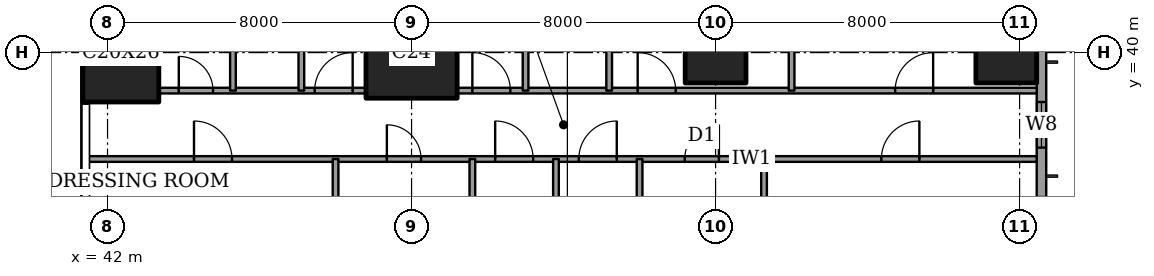
"""IFC4 building model, lengths in metres.
Left out: names, types, materials, properties, quantities, classifications, styles, units other than length and angle.
Written with IfcOpenShell. Run it as: python <this file> out.ifc"""

import sys

from ifc_helpers import new_model, si_unit, direction, frame, frame_2d, origin, origin_2d, place, context, subcontext, project, spatial, rectangle, extrude, element, fill, save


model = new_model("IFC4")
c1 = context("Model", 3, precision=1e-05, world=origin(), true_north=direction((0.0, 1.0)))
c2 = subcontext(c1, "Body", "Model", "MODEL_VIEW")
j1 = project(units=[si_unit("LENGTHUNIT", "METRE"), si_unit("PLANEANGLEUNIT", "RADIAN")], contexts=[c1])
p1 = place(None, origin())
s1 = spatial("IfcSite", under=j1, at=p1, CompositionType="ELEMENT")
p2 = place(p1, origin())
s2 = spatial("IfcBuilding", under=s1, at=p2, CompositionType="ELEMENT")
p3 = place(p2, frame((0.0, 0.0, 248.4)))
s3 = spatial("IfcBuildingStorey", under=s2, at=p3, CompositionType="ELEMENT", Elevation=248.4)
p4 = place(p3, frame((42.35, 40.0, 0.0), z_axis=(0.0, 0.0, 1.0), x_axis=(1.0, 0.0, 0.0)))
e1 = element("IfcColumn", 1, at=p4, inside=s3, PredefinedType="COLUMN", context=c2, shape_type="SweptSolid", body=[
    extrude(rectangle(XDim=2.0, YDim=2.6, at=origin_2d()), origin(), (0.0, 0.0, 1.0), 3.6),
])
p5 = place(p3, frame((50.0, 40.0, 0.0), z_axis=(0.0, 0.0, 1.0), x_axis=(1.0, 0.0, 0.0)))
e2 = element("IfcColumn", 2, at=p5, inside=s3, PredefinedType="COLUMN", context=c2, shape_type="SweptSolid", body=[
    extrude(rectangle(XDim=2.4, YDim=2.4, at=origin_2d()), origin(), (0.0, 0.0, 1.0), 3.6),
])
for number, where, z_axis, x_axis in (
    (3, (58.0, 40.0, 0.0), (0.0, 0.0, 1.0), (1.0, 0.0, 0.0)),
    (4, (65.65, 40.0, 0.0), (0.0, 0.0, 1.0), (1.0, 0.0, 0.0)),
):
    element("IfcColumn", number, at=place(p3, frame(where, z_axis=z_axis, x_axis=x_axis)), inside=s3, PredefinedType="COLUMN", context=c2, shape_type="SweptSolid", body=[
        extrude(rectangle(XDim=1.6, YDim=1.6, at=origin_2d()), origin(), (0.0, 0.0, 1.0), 3.6),
    ])
p6 = place(p3, frame((66.575, 3.175, 0.0), z_axis=(0.0, 0.0, 1.0), x_axis=(0.0, 1.0, 0.0)))
e5 = element("IfcWall", 5, at=p6, inside=s3, PredefinedType="SOLIDWALL", context=c2, shape_type="SweptSolid", body=[
    extrude(rectangle(XDim=41.65, YDim=0.25, at=frame_2d((20.825, 0.0))), origin(), (0.0, 0.0, 1.0), 3.6),
])
p7 = place(p6, frame((0.875, 0.0, 0.6)))
e6 = element("IfcOpeningElement", 6, at=p7, cuts=e5, PredefinedType="OPENING", context=c2, shape_type="SweptSolid", body=[
    extrude(rectangle(XDim=2.4, YDim=2.0, at=frame_2d((1.2, 1.0))), frame((0.0, 0.135, 0.0), z_axis=(0.0, -1.0, 0.0), x_axis=(1.0, 0.0, 0.0)), (0.0, 0.0, 1.0), 0.27),
])
p8 = place(p6, frame((6.0, 0.0, 0.6)))
e7 = element("IfcOpeningElement", 7, at=p8, cuts=e5, PredefinedType="OPENING", context=c2, shape_type="SweptSolid", body=[
    extrude(rectangle(XDim=1.2, YDim=2.0, at=frame_2d((0.6, 1.0))), frame((0.0, 0.135, 0.0), z_axis=(0.0, -1.0, 0.0), x_axis=(1.0, 0.0, 0.0)), (0.0, 0.0, 1.0), 0.27),
])
p9 = place(p6, frame((8.525, 0.0, 0.6)))
e8 = element("IfcOpeningElement", 8, at=p9, cuts=e5, PredefinedType="OPENING", context=c2, shape_type="SweptSolid", body=[
    extrude(rectangle(XDim=2.4, YDim=2.0, at=frame_2d((1.2, 1.0))), frame((0.0, 0.135, 0.0), z_axis=(0.0, -1.0, 0.0), x_axis=(1.0, 0.0, 0.0)), (0.0, 0.0, 1.0), 0.27),
])
p10 = place(p6, frame((15.725, 0.0, 0.6)))
e9 = element("IfcOpeningElement", 9, at=p10, cuts=e5, PredefinedType="OPENING", context=c2, shape_type="SweptSolid", body=[
    extrude(rectangle(XDim=2.4, YDim=2.0, at=frame_2d((1.2, 1.0))), frame((0.0, 0.135, 0.0), z_axis=(0.0, -1.0, 0.0), x_axis=(1.0, 0.0, 0.0)), (0.0, 0.0, 1.0), 0.27),
])
p11 = place(p6, frame((23.525, 0.0, 0.6)))
e10 = element("IfcOpeningElement", 10, at=p11, cuts=e5, PredefinedType="OPENING", context=c2, shape_type="SweptSolid", body=[
    extrude(rectangle(XDim=2.4, YDim=2.0, at=frame_2d((1.2, 1.0))), frame((0.0, 0.135, 0.0), z_axis=(0.0, -1.0, 0.0), x_axis=(1.0, 0.0, 0.0)), (0.0, 0.0, 1.0), 0.27),
])
p12 = place(p6, frame((30.625, 0.0, 0.6)))
e11 = element("IfcOpeningElement", 11, at=p12, cuts=e5, PredefinedType="OPENING", context=c2, shape_type="SweptSolid", body=[
    extrude(rectangle(XDim=2.4, YDim=2.0, at=frame_2d((1.2, 1.0))), frame((0.0, 0.135, 0.0), z_axis=(0.0, -1.0, 0.0), x_axis=(1.0, 0.0, 0.0)), (0.0, 0.0, 1.0), 0.27),
])
p13 = place(p6, frame((34.325, 0.0, 0.6)))
e12 = element("IfcOpeningElement", 12, at=p13, cuts=e5, PredefinedType="OPENING", context=c2, shape_type="SweptSolid", body=[
    extrude(rectangle(XDim=1.2, YDim=2.0, at=frame_2d((0.6, 1.0))), frame((0.0, 0.135, 0.0), z_axis=(0.0, -1.0, 0.0), x_axis=(1.0, 0.0, 0.0)), (0.0, 0.0, 1.0), 0.27),
])
p14 = place(p6, frame((38.375, 0.0, 0.6)))
e13 = element("IfcOpeningElement", 13, at=p14, cuts=e5, PredefinedType="OPENING", context=c2, shape_type="SweptSolid", body=[
    extrude(rectangle(XDim=2.4, YDim=2.0, at=frame_2d((1.2, 1.0))), frame((0.0, 0.135, 0.0), z_axis=(0.0, -1.0, 0.0), x_axis=(1.0, 0.0, 0.0)), (0.0, 0.0, 1.0), 0.27),
])
p15 = place(p3, frame((41.439, 37.2, 0.0), z_axis=(0.0, 0.0, 1.0), x_axis=(1.0, 0.0, 0.0)))
e14 = element("IfcWall", 14, at=p15, inside=s3, PredefinedType="PARTITIONING", context=c2, shape_type="SweptSolid", body=[
    extrude(rectangle(XDim=25.011, YDim=0.15, at=frame_2d((12.505, 0.0))), origin(), (0.0, 0.0, 1.0), 3.35),
])
p16 = place(p15, frame((10.761, 0.0, 0.0)))
e15 = element("IfcOpeningElement", 15, at=p16, cuts=e14, PredefinedType="OPENING", context=c2, shape_type="SweptSolid", body=[
    extrude(rectangle(XDim=1.0, YDim=2.1, at=frame_2d((0.5, 1.05))), frame((0.0, 0.085, 0.0), z_axis=(0.0, -1.0, 0.0), x_axis=(1.0, 0.0, 0.0)), (0.0, 0.0, 1.0), 0.17),
])
p17 = place(p15, frame((20.924, 0.0, 0.0)))
e16 = element("IfcOpeningElement", 16, at=p17, cuts=e14, PredefinedType="OPENING", context=c2, shape_type="SweptSolid", body=[
    extrude(rectangle(XDim=1.0, YDim=2.1, at=frame_2d((0.5, 1.05))), frame((0.0, 0.085, 0.0), z_axis=(0.0, -1.0, 0.0), x_axis=(1.0, 0.0, 0.0)), (0.0, 0.0, 1.0), 0.17),
])
p18 = place(p15, frame((15.749, 0.0, 0.0)))
e17 = element("IfcOpeningElement", 17, at=p18, cuts=e14, PredefinedType="OPENING", context=c2, shape_type="SweptSolid", body=[
    extrude(rectangle(XDim=0.9, YDim=2.1, at=frame_2d((0.45, 1.05))), frame((0.0, 0.085, 0.0), z_axis=(0.0, -1.0, 0.0), x_axis=(1.0, 0.0, 0.0)), (0.0, 0.0, 1.0), 0.17),
])
p19 = place(p15, frame((12.961, 0.0, 0.0)))
e18 = element("IfcOpeningElement", 18, at=p19, cuts=e14, PredefinedType="OPENING", context=c2, shape_type="SweptSolid", body=[
    extrude(rectangle(XDim=1.0, YDim=2.1, at=frame_2d((0.5, 1.05))), frame((0.0, 0.085, 0.0), z_axis=(0.0, -1.0, 0.0), x_axis=(1.0, 0.0, 0.0)), (0.0, 0.0, 1.0), 0.17),
])
p20 = place(p15, frame((7.911, 0.0, 0.0)))
e19 = element("IfcOpeningElement", 19, at=p20, cuts=e14, PredefinedType="OPENING", context=c2, shape_type="SweptSolid", body=[
    extrude(rectangle(XDim=0.9, YDim=2.1, at=frame_2d((0.45, 1.05))), frame((0.0, 0.085, 0.0), z_axis=(0.0, -1.0, 0.0), x_axis=(1.0, 0.0, 0.0)), (0.0, 0.0, 1.0), 0.17),
])
p21 = place(p15, frame((2.836, 0.0, 0.0)))
e20 = element("IfcOpeningElement", 20, at=p21, cuts=e14, PredefinedType="OPENING", context=c2, shape_type="SweptSolid", body=[
    extrude(rectangle(XDim=1.0, YDim=2.1, at=frame_2d((0.5, 1.05))), frame((0.0, 0.085, 0.0), z_axis=(0.0, -1.0, 0.0), x_axis=(1.0, 0.0, 0.0)), (0.0, 0.0, 1.0), 0.17),
])
p22 = place(p3, frame((43.35, 39.0, 0.0), z_axis=(0.0, 0.0, 1.0), x_axis=(1.0, 0.0, 0.0)))
e21 = element("IfcWall", 21, at=p22, inside=s3, PredefinedType="PARTITIONING", context=c2, shape_type="SweptSolid", body=[
    extrude(rectangle(XDim=5.45, YDim=0.15, at=frame_2d((2.725, 0.0))), origin(), (0.0, 0.0, 1.0), 3.35),
])
p23 = place(p22, frame((4.1, 0.0, 0.0)))
e22 = element("IfcOpeningElement", 22, at=p23, cuts=e21, PredefinedType="OPENING", context=c2, shape_type="SweptSolid", body=[
    extrude(rectangle(XDim=1.0, YDim=2.1, at=frame_2d((0.5, 1.05))), frame((0.0, 0.085, 0.0), z_axis=(0.0, -1.0, 0.0), x_axis=(1.0, 0.0, 0.0)), (0.0, 0.0, 1.0), 0.17),
])
p24 = place(p22, frame((0.525, 0.0, 0.0)))
e23 = element("IfcOpeningElement", 23, at=p24, cuts=e21, PredefinedType="OPENING", context=c2, shape_type="SweptSolid", body=[
    extrude(rectangle(XDim=0.9, YDim=2.1, at=frame_2d((0.45, 1.05))), frame((0.0, 0.085, 0.0), z_axis=(0.0, -1.0, 0.0), x_axis=(1.0, 0.0, 0.0)), (0.0, 0.0, 1.0), 0.17),
])
p25 = place(p3, frame((51.2, 39.0, 0.0), z_axis=(0.0, 0.0, 1.0), x_axis=(1.0, 0.0, 0.0)))
e24 = element("IfcWall", 24, at=p25, inside=s3, PredefinedType="PARTITIONING", context=c2, shape_type="SweptSolid", body=[
    extrude(rectangle(XDim=15.25, YDim=0.15, at=frame_2d((7.625, 0.0))), origin(), (0.0, 0.0, 1.0), 3.35),
])
p26 = place(p25, frame((11.525, 0.0, 0.0)))
e25 = element("IfcOpeningElement", 25, at=p26, cuts=e24, PredefinedType="OPENING", context=c2, shape_type="SweptSolid", body=[
    extrude(rectangle(XDim=1.0, YDim=2.1, at=frame_2d((0.5, 1.05))), frame((0.0, 0.085, 0.0), z_axis=(0.0, -1.0, 0.0), x_axis=(1.0, 0.0, 0.0)), (0.0, 0.0, 1.0), 0.17),
])
p27 = place(p25, frame((4.75, 0.0, 0.0)))
e26 = element("IfcOpeningElement", 26, at=p27, cuts=e24, PredefinedType="OPENING", context=c2, shape_type="SweptSolid", body=[
    extrude(rectangle(XDim=1.0, YDim=2.1, at=frame_2d((0.5, 1.05))), frame((0.0, 0.085, 0.0), z_axis=(0.0, -1.0, 0.0), x_axis=(1.0, 0.0, 0.0)), (0.0, 0.0, 1.0), 0.17),
])
p28 = place(p25, frame((0.4, 0.0, 0.0)))
e27 = element("IfcOpeningElement", 27, at=p28, cuts=e24, PredefinedType="OPENING", context=c2, shape_type="SweptSolid", body=[
    extrude(rectangle(XDim=1.0, YDim=2.1, at=frame_2d((0.5, 1.05))), frame((0.0, 0.085, 0.0), z_axis=(0.0, -1.0, 0.0), x_axis=(1.0, 0.0, 0.0)), (0.0, 0.0, 1.0), 0.17),
])
p29 = place(p3, frame((45.3, 39.0, 0.0), z_axis=(0.0, 0.0, 1.0), x_axis=(0.0, 1.0, 0.0)))
e28 = element("IfcWall", 28, at=p29, inside=s3, PredefinedType="PARTITIONING", context=c2, shape_type="SweptSolid", body=[
    extrude(rectangle(XDim=9.45, YDim=0.15, at=frame_2d((4.725, 0.0))), origin(), (0.0, 0.0, 1.0), 3.35),
])
p30 = place(p3, frame((47.1, 39.0, 0.0), z_axis=(0.0, 0.0, 1.0), x_axis=(0.0, 1.0, 0.0)))
e29 = element("IfcWall", 29, at=p30, inside=s3, PredefinedType="PARTITIONING", context=c2, shape_type="SweptSolid", body=[
    extrude(rectangle(XDim=4.7, YDim=0.15, at=frame_2d((2.35, 0.0))), origin(), (0.0, 0.0, 1.0), 3.35),
])
p31 = place(p30, frame((1.9, 0.0, 0.0)))
e30 = element("IfcOpeningElement", 30, at=p31, cuts=e29, PredefinedType="OPENING", context=c2, shape_type="SweptSolid", body=[
    extrude(rectangle(XDim=0.9, YDim=2.1, at=frame_2d((0.45, 1.05))), frame((0.0, 0.085, 0.0), z_axis=(0.0, -1.0, 0.0), x_axis=(1.0, 0.0, 0.0)), (0.0, 0.0, 1.0), 0.17),
])
p32 = place(p3, frame((48.0, 28.0, 0.0), z_axis=(0.0, 0.0, 1.0), x_axis=(0.0, 1.0, 0.0)))
e31 = element("IfcWall", 31, at=p32, inside=s3, PredefinedType="PARTITIONING", context=c2, shape_type="SweptSolid", body=[
    extrude(rectangle(XDim=9.2, YDim=0.15, at=frame_2d((4.6, 0.0))), origin(), (0.0, 0.0, 1.0), 3.35),
])
p33 = place(p32, frame((0.5, 0.0, 0.0)))
e32 = element("IfcOpeningElement", 32, at=p33, cuts=e31, PredefinedType="OPENING", context=c2, shape_type="SweptSolid", body=[
    extrude(rectangle(XDim=1.0, YDim=2.1, at=frame_2d((0.5, 1.05))), frame((0.0, 0.085, 0.0), z_axis=(0.0, -1.0, 0.0), x_axis=(1.0, 0.0, 0.0)), (0.0, 0.0, 1.0), 0.17),
])
p34 = place(p3, frame((51.6, 30.0, 0.0), z_axis=(0.0, 0.0, 1.0), x_axis=(0.0, 1.0, 0.0)))
e33 = element("IfcWall", 33, at=p34, inside=s3, PredefinedType="PARTITIONING", context=c2, shape_type="SweptSolid", body=[
    extrude(rectangle(XDim=7.2, YDim=0.15, at=frame_2d((3.6, 0.0))), origin(), (0.0, 0.0, 1.0), 3.35),
])
p35 = place(p3, frame((53.0, 39.0, 0.0), z_axis=(0.0, 0.0, 1.0), x_axis=(0.0, 1.0, 0.0)))
e34 = element("IfcWall", 34, at=p35, inside=s3, PredefinedType="PARTITIONING", context=c2, shape_type="SweptSolid", body=[
    extrude(rectangle(XDim=9.45, YDim=0.15, at=frame_2d((4.725, 0.0))), origin(), (0.0, 0.0, 1.0), 3.35),
])
p36 = place(p3, frame((53.8, 30.0, 0.0), z_axis=(0.0, 0.0, 1.0), x_axis=(0.0, 1.0, 0.0)))
e35 = element("IfcWall", 35, at=p36, inside=s3, PredefinedType="PARTITIONING", context=c2, shape_type="SweptSolid", body=[
    extrude(rectangle(XDim=7.2, YDim=0.15, at=frame_2d((3.6, 0.0))), origin(), (0.0, 0.0, 1.0), 3.35),
])
p37 = place(p3, frame((55.2, 39.0, 0.0), z_axis=(0.0, 0.0, 1.0), x_axis=(0.0, 1.0, 0.0)))
e36 = element("IfcWall", 36, at=p37, inside=s3, PredefinedType="PARTITIONING", context=c2, shape_type="SweptSolid", body=[
    extrude(rectangle(XDim=3.4, YDim=0.15, at=frame_2d((1.7, 0.0))), origin(), (0.0, 0.0, 1.0), 3.35),
])
p38 = place(p37, frame((1.25, 0.0, 0.0)))
e37 = element("IfcOpeningElement", 37, at=p38, cuts=e36, PredefinedType="OPENING", context=c2, shape_type="SweptSolid", body=[
    extrude(rectangle(XDim=0.9, YDim=2.1, at=frame_2d((0.45, 1.05))), frame((0.0, 0.085, 0.0), z_axis=(0.0, -1.0, 0.0), x_axis=(1.0, 0.0, 0.0)), (0.0, 0.0, 1.0), 0.17),
])
p39 = place(p3, frame((56.0, 28.0, 0.0), z_axis=(0.0, 0.0, 1.0), x_axis=(0.0, 1.0, 0.0)))
e38 = element("IfcWall", 38, at=p39, inside=s3, PredefinedType="PARTITIONING", context=c2, shape_type="SweptSolid", body=[
    extrude(rectangle(XDim=9.2, YDim=0.15, at=frame_2d((4.6, 0.0))), origin(), (0.0, 0.0, 1.0), 3.35),
])
p40 = place(p39, frame((0.5, 0.0, 0.0)))
e39 = element("IfcOpeningElement", 39, at=p40, cuts=e38, PredefinedType="OPENING", context=c2, shape_type="SweptSolid", body=[
    extrude(rectangle(XDim=1.0, YDim=2.1, at=frame_2d((0.5, 1.05))), frame((0.0, 0.085, 0.0), z_axis=(0.0, -1.0, 0.0), x_axis=(1.0, 0.0, 0.0)), (0.0, 0.0, 1.0), 0.17),
])
p41 = place(p3, frame((59.275, 33.2, 0.0), z_axis=(0.0, 0.0, 1.0), x_axis=(0.0, 1.0, 0.0)))
e40 = element("IfcWall", 40, at=p41, inside=s3, PredefinedType="PARTITIONING", context=c2, shape_type="SweptSolid", body=[
    extrude(rectangle(XDim=4.0, YDim=0.15, at=frame_2d((2.0, 0.0))), origin(), (0.0, 0.0, 1.0), 3.35),
])
p42 = place(p3, frame((60.0, 39.0, 0.0), z_axis=(0.0, 0.0, 1.0), x_axis=(0.0, 1.0, 0.0)))
e41 = element("IfcWall", 41, at=p42, inside=s3, PredefinedType="PARTITIONING", context=c2, shape_type="SweptSolid", body=[
    extrude(rectangle(XDim=9.45, YDim=0.15, at=frame_2d((4.725, 0.0))), origin(), (0.0, 0.0, 1.0), 3.35),
])
p43 = place(p13, origin())
e42 = element("IfcWindow", 42, at=p43, inside=s3, PartitioningType="SINGLE_PANEL", PredefinedType="WINDOW", context=c2, shape_type="SweptSolid", body=[
    extrude(rectangle(XDim=1.2, YDim=2.0, at=frame_2d((0.6, 1.0))), frame((0.0, 0.03, 0.0), z_axis=(0.0, -1.0, 0.0), x_axis=(1.0, 0.0, 0.0)), (0.0, 0.0, 1.0), 0.06),
])
fill(e12, e42)
p44 = place(p26, origin())
e43 = element("IfcDoor", 43, at=p44, inside=s3, OperationType="SINGLE_SWING_LEFT", PredefinedType="DOOR", context=c2, shape_type="SweptSolid", body=[
    extrude(rectangle(XDim=1.0, YDim=2.1, at=frame_2d((0.5, 1.05))), frame((0.0, 0.025, 0.0), z_axis=(0.0, -1.0, 0.0), x_axis=(1.0, 0.0, 0.0)), (0.0, 0.0, 1.0), 0.05),
])
fill(e25, e43)
p45 = place(p27, origin())
e44 = element("IfcDoor", 44, at=p45, inside=s3, OperationType="SINGLE_SWING_RIGHT", PredefinedType="DOOR", context=c2, shape_type="SweptSolid", body=[
    extrude(rectangle(XDim=1.0, YDim=2.1, at=frame_2d((0.5, 1.05))), frame((0.0, 0.025, 0.0), z_axis=(0.0, -1.0, 0.0), x_axis=(1.0, 0.0, 0.0)), (0.0, 0.0, 1.0), 0.05),
])
fill(e26, e44)
p46 = place(p28, origin())
e45 = element("IfcDoor", 45, at=p46, inside=s3, OperationType="SINGLE_SWING_RIGHT", PredefinedType="DOOR", context=c2, shape_type="SweptSolid", body=[
    extrude(rectangle(XDim=1.0, YDim=2.1, at=frame_2d((0.5, 1.05))), frame((0.0, 0.025, 0.0), z_axis=(0.0, -1.0, 0.0), x_axis=(1.0, 0.0, 0.0)), (0.0, 0.0, 1.0), 0.05),
])
fill(e27, e45)
p47 = place(p23, origin())
e46 = element("IfcDoor", 46, at=p47, inside=s3, OperationType="SINGLE_SWING_LEFT", PredefinedType="DOOR", context=c2, shape_type="SweptSolid", body=[
    extrude(rectangle(XDim=1.0, YDim=2.1, at=frame_2d((0.5, 1.05))), frame((0.0, 0.025, 0.0), z_axis=(0.0, -1.0, 0.0), x_axis=(1.0, 0.0, 0.0)), (0.0, 0.0, 1.0), 0.05),
])
fill(e22, e46)
p48 = place(p24, origin())
e47 = element("IfcDoor", 47, at=p48, inside=s3, OperationType="SINGLE_SWING_RIGHT", PredefinedType="DOOR", context=c2, shape_type="SweptSolid", body=[
    extrude(rectangle(XDim=0.9, YDim=2.1, at=frame_2d((0.45, 1.05))), frame((0.0, 0.025, 0.0), z_axis=(0.0, -1.0, 0.0), x_axis=(1.0, 0.0, 0.0)), (0.0, 0.0, 1.0), 0.05),
])
fill(e23, e47)
p49 = place(p16, origin())
e48 = element("IfcDoor", 48, at=p49, inside=s3, OperationType="SINGLE_SWING_RIGHT", PredefinedType="DOOR", context=c2, shape_type="SweptSolid", body=[
    extrude(rectangle(XDim=1.0, YDim=2.1, at=frame_2d((0.5, 1.05))), frame((0.0, 0.025, 0.0), z_axis=(0.0, -1.0, 0.0), x_axis=(1.0, 0.0, 0.0)), (0.0, 0.0, 1.0), 0.05),
])
fill(e15, e48)
p50 = place(p17, origin())
e49 = element("IfcDoor", 49, at=p50, inside=s3, OperationType="SINGLE_SWING_LEFT", PredefinedType="DOOR", context=c2, shape_type="SweptSolid", body=[
    extrude(rectangle(XDim=1.0, YDim=2.1, at=frame_2d((0.5, 1.05))), frame((0.0, 0.025, 0.0), z_axis=(0.0, -1.0, 0.0), x_axis=(1.0, 0.0, 0.0)), (0.0, 0.0, 1.0), 0.05),
])
fill(e16, e49)
p51 = place(p18, origin())
e50 = element("IfcDoor", 50, at=p51, inside=s3, OperationType="SINGLE_SWING_LEFT", PredefinedType="DOOR", context=c2, shape_type="SweptSolid", body=[
    extrude(rectangle(XDim=0.9, YDim=2.1, at=frame_2d((0.45, 1.05))), frame((0.0, 0.025, 0.0), z_axis=(0.0, -1.0, 0.0), x_axis=(1.0, 0.0, 0.0)), (0.0, 0.0, 1.0), 0.05),
])
fill(e17, e50)
p52 = place(p19, origin())
e51 = element("IfcDoor", 51, at=p52, inside=s3, OperationType="SINGLE_SWING_LEFT", PredefinedType="DOOR", context=c2, shape_type="SweptSolid", body=[
    extrude(rectangle(XDim=1.0, YDim=2.1, at=frame_2d((0.5, 1.05))), frame((0.0, 0.025, 0.0), z_axis=(0.0, -1.0, 0.0), x_axis=(1.0, 0.0, 0.0)), (0.0, 0.0, 1.0), 0.05),
])
fill(e18, e51)
p53 = place(p20, origin())
e52 = element("IfcDoor", 52, at=p53, inside=s3, OperationType="SINGLE_SWING_RIGHT", PredefinedType="DOOR", context=c2, shape_type="SweptSolid", body=[
    extrude(rectangle(XDim=0.9, YDim=2.1, at=frame_2d((0.45, 1.05))), frame((0.0, 0.025, 0.0), z_axis=(0.0, -1.0, 0.0), x_axis=(1.0, 0.0, 0.0)), (0.0, 0.0, 1.0), 0.05),
])
fill(e19, e52)
p54 = place(p21, origin())
e53 = element("IfcDoor", 53, at=p54, inside=s3, OperationType="SINGLE_SWING_RIGHT", PredefinedType="DOOR", context=c2, shape_type="SweptSolid", body=[
    extrude(rectangle(XDim=1.0, YDim=2.1, at=frame_2d((0.5, 1.05))), frame((0.0, 0.025, 0.0), z_axis=(0.0, -1.0, 0.0), x_axis=(1.0, 0.0, 0.0)), (0.0, 0.0, 1.0), 0.05),
])
fill(e20, e53)
save(model, sys.argv[1])
